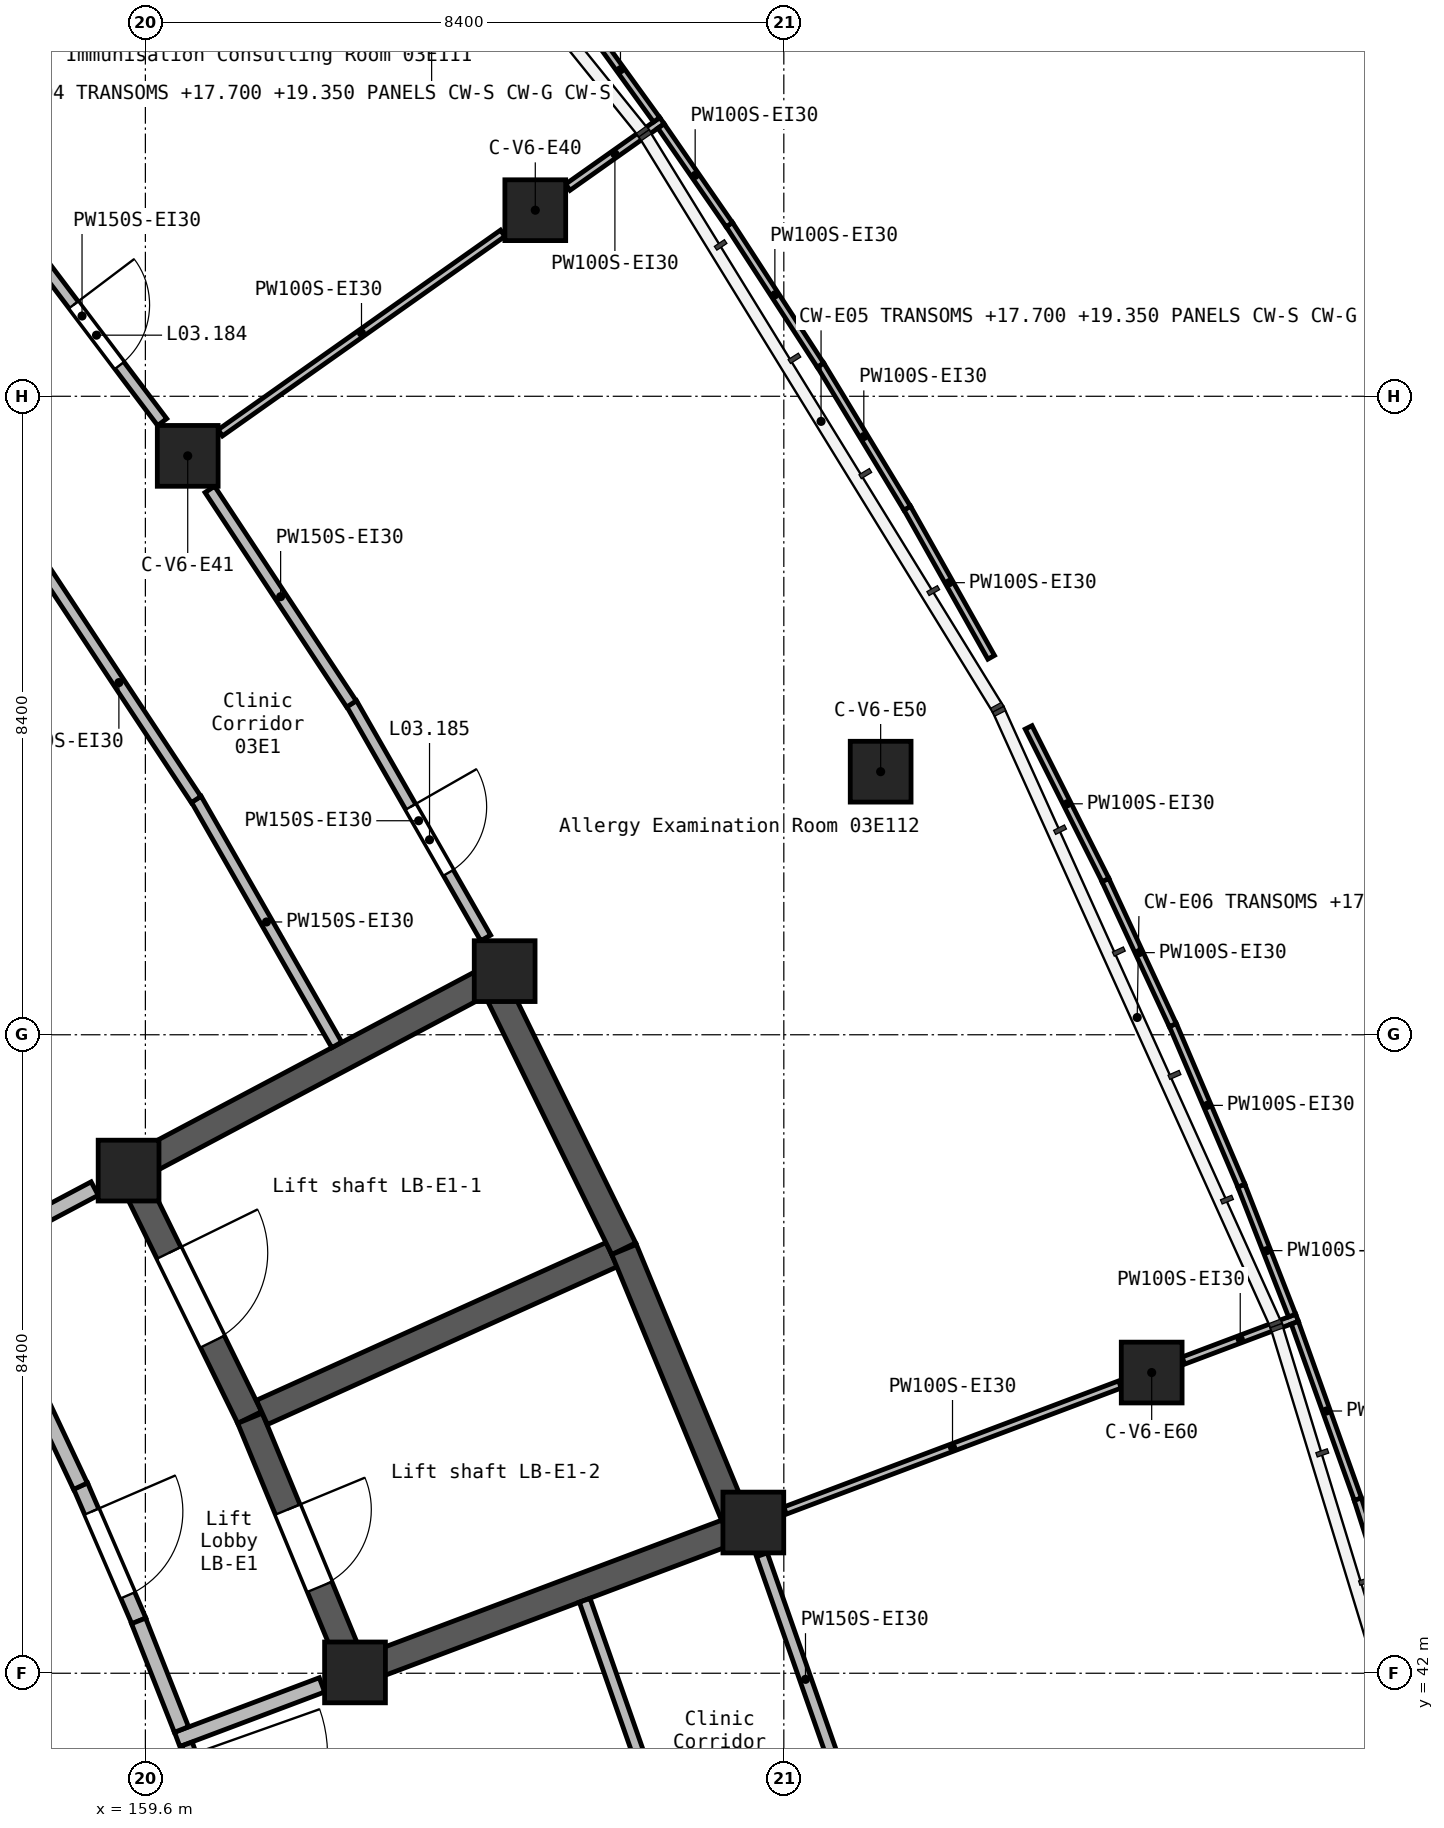
"""IFC4 building model, lengths in metres.
Left out: names, types, materials, properties, quantities, classifications, styles, units other than length and angle.
Written with IfcOpenShell. Run it as: python <this file> out.ifc"""

import sys

from ifc_helpers import new_model, si_unit, direction, frame, frame_2d, origin, origin_2d, place, context, subcontext, project, spatial, rectangle, extrude, element, fill, save


model = new_model("IFC4")
c1 = context("Model", 3, precision=1e-05, world=origin(), true_north=direction((0.0, 1.0)))
c2 = subcontext(c1, "Body", "Model", "MODEL_VIEW")
j1 = project(units=[si_unit("LENGTHUNIT", "METRE"), si_unit("PLANEANGLEUNIT", "RADIAN")], contexts=[c1])
p1 = place(None, origin())
s1 = spatial("IfcSite", under=j1, at=p1, CompositionType="ELEMENT")
p2 = place(p1, origin())
s2 = spatial("IfcBuilding", under=s1, at=p2, CompositionType="ELEMENT")
p3 = place(p2, frame((0.0, 0.0, 16.8)))
s3 = spatial("IfcBuildingStorey", under=s2, at=p3, CompositionType="ELEMENT", Elevation=16.8)
for number, where, z_axis, x_axis in (
    (1, (159.379, 48.613, 0.0), (0.0, 0.0, 1.0), (1.0, 0.0, 0.0)),
    (2, (160.157, 58.016, 0.0), (0.0, 0.0, 1.0), (1.0, 0.0, 0.0)),
    (3, (162.358, 42.011, 0.0), (0.0, 0.0, 1.0), (1.0, 0.0, 0.0)),
    (4, (164.327, 51.237, 0.0), (0.0, 0.0, 1.0), (1.0, 0.0, 0.0)),
    (5, (164.73, 61.248, 0.0), (0.0, 0.0, 1.0), (1.0, 0.0, 0.0)),
    (6, (167.599, 43.983, 0.0), (0.0, 0.0, 1.0), (1.0, 0.0, 0.0)),
    (7, (169.274, 53.861, 0.0), (0.0, 0.0, 1.0), (1.0, 0.0, 0.0)),
    (8, (172.84, 45.956, 0.0), (0.0, 0.0, 1.0), (1.0, 0.0, 0.0)),
):
    element("IfcColumn", number, at=place(p3, frame(where, z_axis=z_axis, x_axis=x_axis)), inside=s3, PredefinedType="COLUMN", context=c2, shape_type="SweptSolid", body=[
        extrude(rectangle(XDim=0.8, YDim=0.8, at=origin_2d()), origin(), (0.0, 0.0, 1.0), 4.2),
    ])
p4 = place(p3, frame((159.224, 48.531, 0.0), z_axis=(0.0, 0.0, 1.0), x_axis=(0.883393138637, 0.468632652094, 0.0)))
e9 = element("IfcWall", 9, at=p4, inside=s3, PredefinedType="SHEAR", context=c2, shape_type="SweptSolid", body=[
    extrude(rectangle(XDim=5.751, YDim=0.35, at=frame_2d((2.875, 0.0))), origin(), (0.0, 0.0, 1.0), 4.2),
])
p5 = place(p3, frame((159.456, 48.456, 0.0), z_axis=(0.0, 0.0, 1.0), x_axis=(0.440221126053, -0.89788939195, 0.0)))
e10 = element("IfcWall", 10, at=p5, inside=s3, PredefinedType="SHEAR", context=c2, shape_type="SweptSolid", body=[
    extrude(rectangle(XDim=3.442, YDim=0.35, at=frame_2d((1.721, 0.0))), origin(), (0.0, 0.0, 1.0), 4.2),
])
p6 = place(p5, frame((1.031, 0.0, 0.0)))
e11 = element("IfcOpeningElement", 11, at=p6, cuts=e10, PredefinedType="OPENING", context=c2, shape_type="SweptSolid", body=[
    extrude(rectangle(XDim=1.3, YDim=2.1, at=frame_2d((0.65, 1.05))), frame((0.0, 0.185, 0.0), z_axis=(0.0, -1.0, 0.0), x_axis=(1.0, 0.0, 0.0)), (0.0, 0.0, 1.0), 0.37),
])
p7 = place(p3, frame((160.976, 45.355, 0.0), z_axis=(0.0, 0.0, 1.0), x_axis=(0.381990591944, -0.924166212143, 0.0)))
e12 = element("IfcWall", 12, at=p7, inside=s3, PredefinedType="SHEAR", context=c2, shape_type="SweptSolid", body=[
    extrude(rectangle(XDim=3.443, YDim=0.35, at=frame_2d((1.721, 0.0))), origin(), (0.0, 0.0, 1.0), 4.2),
])
p8 = place(p7, frame((1.3, 0.0, 0.0)))
e13 = element("IfcOpeningElement", 13, at=p8, cuts=e12, PredefinedType="OPENING", context=c2, shape_type="SweptSolid", body=[
    extrude(rectangle(XDim=1.1, YDim=2.1, at=frame_2d((0.55, 1.05))), frame((0.0, 0.185, 0.0), z_axis=(0.0, -1.0, 0.0), x_axis=(1.0, 0.0, 0.0)), (0.0, 0.0, 1.0), 0.37),
])
p9 = place(p3, frame((161.134, 45.432, 0.0), z_axis=(0.0, 0.0, 1.0), x_axis=(0.911564728385, 0.411156595427, 0.0)))
e14 = element("IfcWall", 14, at=p9, inside=s3, PredefinedType="SHEAR", context=c2, shape_type="SweptSolid", body=[
    extrude(rectangle(XDim=5.05, YDim=0.35, at=frame_2d((2.525, 0.0))), origin(), (0.0, 0.0, 1.0), 4.2),
])
p10 = place(p3, frame((162.194, 41.949, 0.0), z_axis=(0.0, 0.0, 1.0), x_axis=(0.935920223106, 0.352212061095, 0.0)))
e15 = element("IfcWall", 15, at=p10, inside=s3, PredefinedType="SHEAR", context=c2, shape_type="SweptSolid", body=[
    extrude(rectangle(XDim=5.75, YDim=0.35, at=frame_2d((2.875, 0.0))), origin(), (0.0, 0.0, 1.0), 4.2),
])
p11 = place(p3, frame((165.894, 47.585, 0.0), z_axis=(0.0, 0.0, 1.0), x_axis=(-0.43992897418, 0.898032570499, 0.0)))
e16 = element("IfcWall", 16, at=p11, inside=s3, PredefinedType="SHEAR", context=c2, shape_type="SweptSolid", body=[
    extrude(rectangle(XDim=3.788, YDim=0.35, at=frame_2d((1.894, 0.0))), origin(), (0.0, 0.0, 1.0), 4.2),
])
p12 = place(p3, frame((167.345, 44.075, 0.0), z_axis=(0.0, 0.0, 1.0), x_axis=(-0.382046231428, 0.924143212415, 0.0)))
e17 = element("IfcWall", 17, at=p12, inside=s3, PredefinedType="SHEAR", context=c2, shape_type="SweptSolid", body=[
    extrude(rectangle(XDim=3.788, YDim=0.35, at=frame_2d((1.894, 0.0))), origin(), (0.0, 0.0, 1.0), 4.2),
])
p13 = place(p3, frame((160.018, 41.13, 0.0), z_axis=(0.0, 0.0, 1.0), x_axis=(0.935835444075, 0.352437259115, 0.0)))
e18 = element("IfcWall", 18, at=p13, inside=s3, PredefinedType="SOLIDWALL", context=c2, shape_type="SweptSolid", body=[
    extrude(rectangle(XDim=2.036, YDim=0.2, at=frame_2d((1.018, 0.0))), origin(), (0.0, 0.0, 1.0), 3.9),
])
p14 = place(p3, frame((157.171, 47.442, 0.0), z_axis=(0.0, 0.0, 1.0), x_axis=(0.883475149074, 0.468478026133, 0.0)))
e19 = element("IfcWall", 19, at=p14, inside=s3, PredefinedType="SOLIDWALL", context=c2, shape_type="SweptSolid", body=[
    extrude(rectangle(XDim=1.995, YDim=0.2, at=frame_2d((0.998, 0.0))), origin(), (0.0, 0.0, 1.0), 3.9),
])
p15 = place(p3, frame((158.747, 44.465, 0.0), z_axis=(0.0, 0.0, 1.0), x_axis=(0.396322487651, -0.918111368943, 0.0)))
e20 = element("IfcWall", 20, at=p15, inside=s3, PredefinedType="SOLIDWALL", context=c2, shape_type="SweptSolid", body=[
    extrude(rectangle(XDim=1.936, YDim=0.2, at=frame_2d((0.968, 0.0))), origin(), (0.0, 0.0, 1.0), 3.9),
])
p16 = place(p15, frame((0.368, 0.0, 0.0)))
e21 = element("IfcOpeningElement", 21, at=p16, cuts=e20, PredefinedType="OPENING", context=c2, shape_type="SweptSolid", body=[
    extrude(rectangle(XDim=1.2, YDim=2.1, at=frame_2d((0.6, 1.05))), frame((0.0, 0.11, 0.0), z_axis=(0.0, -1.0, 0.0), x_axis=(1.0, 0.0, 0.0)), (0.0, 0.0, 1.0), 0.22),
])
p17 = place(p3, frame((158.089, 45.855, 0.0), z_axis=(0.0, 0.0, 1.0), x_axis=(0.42579703633, -0.904818702201, 0.0)))
e22 = element("IfcWall", 22, at=p17, inside=s3, PredefinedType="SOLIDWALL", context=c2, shape_type="SweptSolid", body=[
    extrude(rectangle(XDim=1.541, YDim=0.2, at=frame_2d((0.771, 0.0))), origin(), (0.0, 0.0, 1.0), 3.9),
])
p18 = place(p3, frame((159.51, 42.689, 0.0), z_axis=(0.0, 0.0, 1.0), x_axis=(0.367195475631, -0.930143796773, 0.0)))
e23 = element("IfcWall", 23, at=p18, inside=s3, PredefinedType="SOLIDWALL", context=c2, shape_type="SweptSolid", body=[
    extrude(rectangle(XDim=1.537, YDim=0.2, at=frame_2d((0.768, 0.0))), origin(), (0.0, 0.0, 1.0), 3.9),
])
p19 = place(p3, frame((162.313, 54.758, 0.0), z_axis=(0.0, 0.0, 1.0), x_axis=(0.496582798362, -0.867989357291, 0.0)))
e24 = element("IfcWall", 24, at=p19, inside=s3, PredefinedType="PARTITIONING", context=c2, shape_type="SweptSolid", body=[
    extrude(rectangle(XDim=3.553, YDim=0.15, at=frame_2d((1.777, 0.0))), origin(), (0.0, 0.0, 1.0), 3.9),
])
p20 = place(p19, frame((1.566, 0.0, 0.0)))
e25 = element("IfcOpeningElement", 25, at=p20, cuts=e24, PredefinedType="OPENING", context=c2, shape_type="SweptSolid", body=[
    extrude(rectangle(XDim=1.0, YDim=2.1, at=frame_2d((0.5, 1.05))), frame((0.0, 0.085, 0.0), z_axis=(0.0, -1.0, 0.0), x_axis=(1.0, 0.0, 0.0)), (0.0, 0.0, 1.0), 0.17),
])
p21 = place(p3, frame((160.448, 57.575, 0.0), z_axis=(0.0, 0.0, 1.0), x_axis=(0.550814058929, -0.834627984485, 0.0)))
e26 = element("IfcWall", 26, at=p21, inside=s3, PredefinedType="PARTITIONING", context=c2, shape_type="SweptSolid", body=[
    extrude(rectangle(XDim=3.383, YDim=0.15, at=frame_2d((1.692, 0.0))), origin(), (0.0, 0.0, 1.0), 3.9),
])
p22 = place(p3, frame((157.712, 61.252, 0.0), z_axis=(0.0, 0.0, 1.0), x_axis=(0.602876520925, -0.797834506974, 0.0)))
e27 = element("IfcWall", 27, at=p22, inside=s3, PredefinedType="PARTITIONING", context=c2, shape_type="SweptSolid", body=[
    extrude(rectangle(XDim=3.499, YDim=0.15, at=frame_2d((1.75, 0.0))), origin(), (0.0, 0.0, 1.0), 3.9),
])
p23 = place(p22, frame((1.565, 0.0, 0.0)))
e28 = element("IfcOpeningElement", 28, at=p23, cuts=e27, PredefinedType="OPENING", context=c2, shape_type="SweptSolid", body=[
    extrude(rectangle(XDim=1.0, YDim=2.1, at=frame_2d((0.5, 1.05))), frame((0.0, 0.085, 0.0), z_axis=(0.0, -1.0, 0.0), x_axis=(1.0, 0.0, 0.0)), (0.0, 0.0, 1.0), 0.17),
])
p24 = place(p3, frame((167.711, 43.559, 0.0), z_axis=(0.0, 0.0, 1.0), x_axis=(0.330491338893, -0.9438090246, 0.0)))
e29 = element("IfcWall", 29, at=p24, inside=s3, PredefinedType="PARTITIONING", context=c2, shape_type="SweptSolid", body=[
    extrude(rectangle(XDim=3.473, YDim=0.15, at=frame_2d((1.736, 0.0))), origin(), (0.0, 0.0, 1.0), 3.9),
])
p25 = place(p3, frame((160.269, 53.501, 0.0), z_axis=(0.0, 0.0, 1.0), x_axis=(0.496371795626, -0.8681100394, 0.0)))
e30 = element("IfcWall", 30, at=p25, inside=s3, PredefinedType="PARTITIONING", context=c2, shape_type="SweptSolid", body=[
    extrude(rectangle(XDim=3.726, YDim=0.15, at=frame_2d((1.863, 0.0))), origin(), (0.0, 0.0, 1.0), 3.9),
])
p26 = place(p3, frame((158.236, 56.571, 0.0), z_axis=(0.0, 0.0, 1.0), x_axis=(0.550996276136, -0.834507701393, 0.0)))
e31 = element("IfcWall", 31, at=p26, inside=s3, PredefinedType="PARTITIONING", context=c2, shape_type="SweptSolid", body=[
    extrude(rectangle(XDim=3.687, YDim=0.15, at=frame_2d((1.843, 0.0))), origin(), (0.0, 0.0, 1.0), 3.9),
])
p27 = place(p3, frame((165.38, 42.96, 0.0), z_axis=(0.0, 0.0, 1.0), x_axis=(0.330508329073, -0.943803075018, 0.0)))
e32 = element("IfcWall", 32, at=p27, inside=s3, PredefinedType="PARTITIONING", context=c2, shape_type="SweptSolid", body=[
    extrude(rectangle(XDim=3.581, YDim=0.15, at=frame_2d((1.791, 0.0))), origin(), (0.0, 0.0, 1.0), 3.9),
])
p28 = place(p3, frame((160.146, 41.068, 0.0), z_axis=(0.0, 0.0, 1.0), x_axis=(0.334170983673, -0.942512468708, 0.0)))
e33 = element("IfcWall", 33, at=p28, inside=s3, PredefinedType="PARTITIONING", context=c2, shape_type="SweptSolid", body=[
    extrude(rectangle(XDim=2.079, YDim=0.15, at=frame_2d((1.04, 0.0))), origin(), (0.0, 0.0, 1.0), 3.9),
])
p29 = place(p28, frame((0.151, 0.0, 0.0)))
e34 = element("IfcOpeningElement", 34, at=p29, cuts=e33, PredefinedType="OPENING", context=c2, shape_type="SweptSolid", body=[
    extrude(rectangle(XDim=1.8, YDim=2.1, at=frame_2d((0.9, 1.05))), frame((0.0, 0.085, 0.0), z_axis=(0.0, -1.0, 0.0), x_axis=(1.0, 0.0, 0.0)), (0.0, 0.0, 1.0), 0.17),
])
p30 = place(p3, frame((168.016, 44.14, 0.0), z_axis=(0.0, 0.0, 1.0), x_axis=(0.935850976525, 0.352396012659, 0.0)))
e35 = element("IfcWall", 35, at=p30, inside=s3, PredefinedType="PARTITIONING", context=c2, shape_type="SweptSolid", body=[
    extrude(rectangle(XDim=4.708, YDim=0.1, at=frame_2d((2.354, 0.0))), origin(), (0.0, 0.0, 1.0), 3.9),
])
p31 = place(p3, frame((173.257, 46.114, 0.0), z_axis=(0.0, 0.0, 1.0), x_axis=(0.93586999438, 0.35234550319, 0.0)))
e36 = element("IfcWall", 36, at=p31, inside=s3, PredefinedType="PARTITIONING", context=c2, shape_type="SweptSolid", body=[
    extrude(rectangle(XDim=1.598, YDim=0.1, at=frame_2d((0.799, 0.0))), origin(), (0.0, 0.0, 1.0), 3.9),
])
p32 = place(p3, frame((160.585, 58.319, 0.0), z_axis=(0.0, 0.0, 1.0), x_axis=(0.816630246187, 0.577161191534, 0.0)))
e37 = element("IfcWall", 37, at=p32, inside=s3, PredefinedType="PARTITIONING", context=c2, shape_type="SweptSolid", body=[
    extrude(rectangle(XDim=4.551, YDim=0.1, at=frame_2d((2.275, 0.0))), origin(), (0.0, 0.0, 1.0), 3.9),
])
p33 = place(p3, frame((165.158, 61.551, 0.0), z_axis=(0.0, 0.0, 1.0), x_axis=(0.816659911288, 0.577119215842, 0.0)))
e38 = element("IfcWall", 38, at=p33, inside=s3, PredefinedType="PARTITIONING", context=c2, shape_type="SweptSolid", body=[
    extrude(rectangle(XDim=1.517, YDim=0.1, at=frame_2d((0.758, 0.0))), origin(), (0.0, 0.0, 1.0), 3.9),
])
p34 = place(p3, frame((174.723, 46.611, 0.0), z_axis=(0.0, 0.0, 1.0), x_axis=(0.336762779461, -0.94158952329, 0.0)))
e39 = element("IfcWall", 39, at=p34, inside=s3, PredefinedType="PARTITIONING", context=c2, shape_type="SweptSolid", body=[
    extrude(rectangle(XDim=2.466, YDim=0.1, at=frame_2d((1.233, 0.0))), origin(), (0.0, 0.0, 1.0), 3.9),
])
p35 = place(p3, frame((169.624, 57.33, 0.0), z_axis=(0.0, 0.0, 1.0), x_axis=(0.490245804698, -0.871584219095, 0.0)))
e40 = element("IfcWall", 40, at=p35, inside=s3, PredefinedType="PARTITIONING", context=c2, shape_type="SweptSolid", body=[
    extrude(rectangle(XDim=2.253, YDim=0.1, at=frame_2d((1.126, 0.0))), origin(), (0.0, 0.0, 1.0), 3.9),
])
p36 = place(p3, frame((168.482, 59.213, 0.0), z_axis=(0.0, 0.0, 1.0), x_axis=(0.517604223091, -0.855620165867, 0.0)))
e41 = element("IfcWall", 41, at=p36, inside=s3, PredefinedType="PARTITIONING", context=c2, shape_type="SweptSolid", body=[
    extrude(rectangle(XDim=2.204, YDim=0.1, at=frame_2d((1.102, 0.0))), origin(), (0.0, 0.0, 1.0), 3.9),
])
p37 = place(p3, frame((167.283, 61.059, 0.0), z_axis=(0.0, 0.0, 1.0), x_axis=(0.544248024884, -0.838924363342, 0.0)))
e42 = element("IfcWall", 42, at=p37, inside=s3, PredefinedType="PARTITIONING", context=c2, shape_type="SweptSolid", body=[
    extrude(rectangle(XDim=2.203, YDim=0.1, at=frame_2d((1.102, 0.0))), origin(), (0.0, 0.0, 1.0), 3.9),
])
p38 = place(p3, frame((171.221, 54.444, 0.0), z_axis=(0.0, 0.0, 1.0), x_axis=(0.449727785834, -0.893165672565, 0.0)))
e43 = element("IfcWall", 43, at=p38, inside=s3, PredefinedType="PARTITIONING", context=c2, shape_type="SweptSolid", body=[
    extrude(rectangle(XDim=2.251, YDim=0.1, at=frame_2d((1.125, 0.0))), origin(), (0.0, 0.0, 1.0), 3.9),
])
p39 = place(p3, frame((173.118, 50.529, 0.0), z_axis=(0.0, 0.0, 1.0), x_axis=(0.392535641105, -0.919736794122, 0.0)))
e44 = element("IfcWall", 44, at=p39, inside=s3, PredefinedType="PARTITIONING", context=c2, shape_type="SweptSolid", body=[
    extrude(rectangle(XDim=2.301, YDim=0.1, at=frame_2d((1.15, 0.0))), origin(), (0.0, 0.0, 1.0), 3.9),
])
p40 = place(p3, frame((175.552, 44.29, 0.0), z_axis=(0.0, 0.0, 1.0), x_axis=(0.304461914253, -0.952524510325, 0.0)))
e45 = element("IfcWall", 45, at=p40, inside=s3, PredefinedType="PARTITIONING", context=c2, shape_type="SweptSolid", body=[
    extrude(rectangle(XDim=2.202, YDim=0.1, at=frame_2d((1.101, 0.0))), origin(), (0.0, 0.0, 1.0), 3.9),
])
p41 = place(p3, frame((172.231, 52.434, 0.0), z_axis=(0.0, 0.0, 1.0), x_axis=(0.42144215668, -0.906855285353, 0.0)))
e46 = element("IfcWall", 46, at=p41, inside=s3, PredefinedType="PARTITIONING", context=c2, shape_type="SweptSolid", body=[
    extrude(rectangle(XDim=2.103, YDim=0.1, at=frame_2d((1.051, 0.0))), origin(), (0.0, 0.0, 1.0), 3.9),
])
p42 = place(p3, frame((174.02, 48.414, 0.0), z_axis=(0.0, 0.0, 1.0), x_axis=(0.364148326517, -0.931340966722, 0.0)))
e47 = element("IfcWall", 47, at=p42, inside=s3, PredefinedType="PARTITIONING", context=c2, shape_type="SweptSolid", body=[
    extrude(rectangle(XDim=1.834, YDim=0.1, at=frame_2d((0.917, 0.0))), origin(), (0.0, 0.0, 1.0), 3.9),
])
p43 = place(p3, frame((166.385, 62.355, 0.0), z_axis=(0.0, 0.0, 1.0), x_axis=(0.568646920536, -0.822581716163, 0.0)))
e48 = element("IfcWall", 48, at=p43, inside=s3, PredefinedType="PARTITIONING", context=c2, shape_type="SweptSolid", body=[
    extrude(rectangle(XDim=1.579, YDim=0.1, at=frame_2d((0.789, 0.0))), origin(), (0.0, 0.0, 1.0), 3.9),
])
p44 = place(p3, frame((165.375, 63.755, 0.0), z_axis=(0.0, 0.0, 1.0), x_axis=(0.585622227381, -0.810584114573, 0.0)))
e49 = element("IfcWall", 49, at=p44, inside=s3, PredefinedType="PARTITIONING", context=c2, shape_type="SweptSolid", body=[
    extrude(rectangle(XDim=1.625, YDim=0.1, at=frame_2d((0.812, 0.0))), origin(), (0.0, 0.0, 1.0), 3.9),
])
p45 = place(p16, origin())
e50 = element("IfcDoor", 50, at=p45, inside=s3, OperationType="SINGLE_SWING_LEFT", PredefinedType="DOOR", context=c2, shape_type="SweptSolid", body=[
    extrude(rectangle(XDim=1.2, YDim=2.1, at=frame_2d((0.6, 1.05))), frame((0.0, 0.025, 0.0), z_axis=(0.0, -1.0, 0.0), x_axis=(1.0, 0.0, 0.0)), (0.0, 0.0, 1.0), 0.05),
])
fill(e21, e50)
p46 = place(p23, origin())
e51 = element("IfcDoor", 51, at=p46, inside=s3, OperationType="SINGLE_SWING_RIGHT", PredefinedType="DOOR", context=c2, shape_type="SweptSolid", body=[
    extrude(rectangle(XDim=1.0, YDim=2.1, at=frame_2d((0.5, 1.05))), frame((0.0, 0.025, 0.0), z_axis=(0.0, -1.0, 0.0), x_axis=(1.0, 0.0, 0.0)), (0.0, 0.0, 1.0), 0.05),
])
fill(e28, e51)
p47 = place(p20, origin())
e52 = element("IfcDoor", 52, at=p47, inside=s3, OperationType="SINGLE_SWING_RIGHT", PredefinedType="DOOR", context=c2, shape_type="SweptSolid", body=[
    extrude(rectangle(XDim=1.0, YDim=2.1, at=frame_2d((0.5, 1.05))), frame((0.0, 0.025, 0.0), z_axis=(0.0, -1.0, 0.0), x_axis=(1.0, 0.0, 0.0)), (0.0, 0.0, 1.0), 0.05),
])
fill(e25, e52)
p48 = place(p6, origin())
e53 = element("IfcDoor", 53, at=p48, inside=s3, OperationType="DOUBLE_DOOR_SLIDING", PredefinedType="DOOR", context=c2, shape_type="SweptSolid", body=[
    extrude(rectangle(XDim=1.3, YDim=2.1, at=frame_2d((0.65, 1.05))), frame((0.0, 0.025, 0.0), z_axis=(0.0, -1.0, 0.0), x_axis=(1.0, 0.0, 0.0)), (0.0, 0.0, 1.0), 0.05),
])
fill(e11, e53)
p49 = place(p8, origin())
e54 = element("IfcDoor", 54, at=p49, inside=s3, OperationType="DOUBLE_DOOR_SLIDING", PredefinedType="DOOR", context=c2, shape_type="SweptSolid", body=[
    extrude(rectangle(XDim=1.1, YDim=2.1, at=frame_2d((0.55, 1.05))), frame((0.0, 0.025, 0.0), z_axis=(0.0, -1.0, 0.0), x_axis=(1.0, 0.0, 0.0)), (0.0, 0.0, 1.0), 0.05),
])
fill(e13, e54)
save(model, sys.argv[1])
